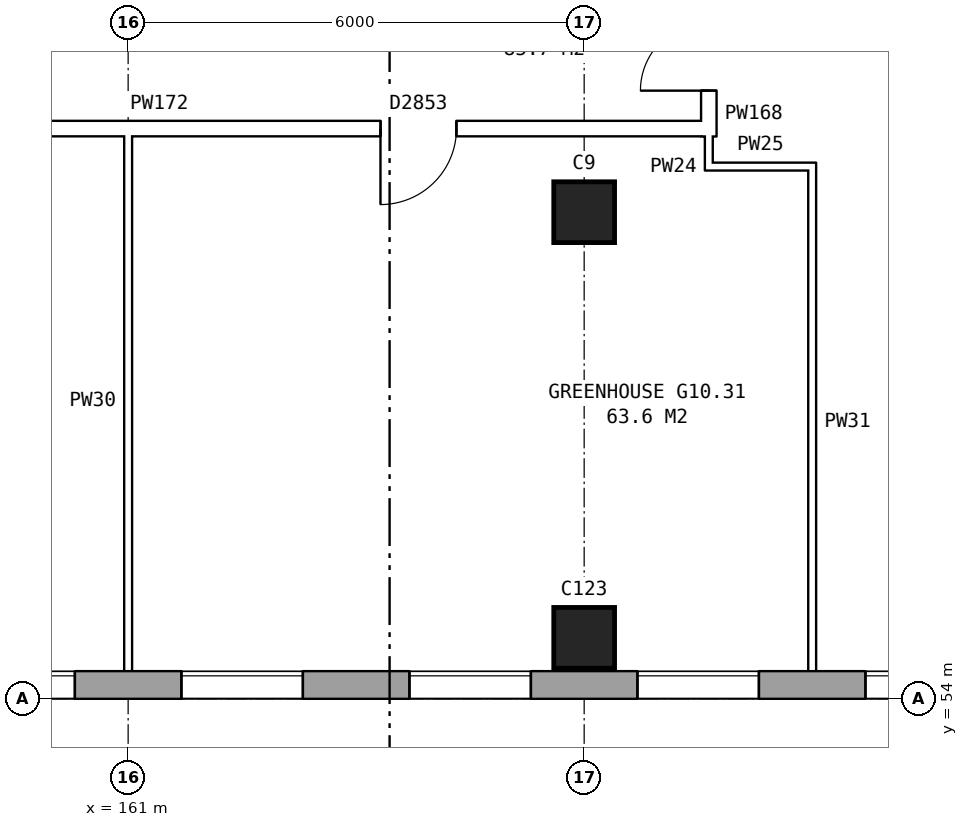
"""IFC4 building model, lengths in metres.
Left out: names, types, materials, properties, quantities, classifications, styles, units other than length and angle.
Written with IfcOpenShell. Run it as: python <this file> out.ifc"""

import sys

from ifc_helpers import new_model, si_unit, direction, frame, frame_2d, origin, origin_2d, place, context, subcontext, project, spatial, rectangle, extrude, element, fill, save


model = new_model("IFC4")
c1 = context("Model", 3, precision=1e-05, world=origin(), true_north=direction((0.0, 1.0)))
c2 = subcontext(c1, "Body", "Model", "MODEL_VIEW")
j1 = project(units=[si_unit("LENGTHUNIT", "METRE"), si_unit("PLANEANGLEUNIT", "RADIAN")], contexts=[c1])
p1 = place(None, origin())
s1 = spatial("IfcSite", under=j1, at=p1, CompositionType="ELEMENT")
p2 = place(p1, origin())
s2 = spatial("IfcBuilding", under=s1, at=p2, CompositionType="ELEMENT")
p3 = place(p2, frame((0.0, 0.0, 38.1)))
s3 = spatial("IfcBuildingStorey", under=s2, at=p3, CompositionType="ELEMENT", Elevation=38.1)
for number, where, z_axis, x_axis in (
    (1, (167.0, 54.8, 0.0), (0.0, 0.0, 1.0), (1.0, 0.0, 0.0)),
    (2, (167.0, 60.4, 0.0), (0.0, 0.0, 1.0), (1.0, 0.0, 0.0)),
):
    element("IfcColumn", number, at=place(p3, frame(where, z_axis=z_axis, x_axis=x_axis)), inside=s3, PredefinedType="COLUMN", context=c2, shape_type="SweptSolid", body=[
        extrude(rectangle(XDim=0.8, YDim=0.8, at=origin_2d()), origin(), (0.0, 0.0, 1.0), 5.6),
    ])
p4 = place(p3, frame((134.075, 54.18, 0.0), z_axis=(0.0, 0.0, 1.0), x_axis=(1.0, 0.0, 0.0)))
e3 = element("IfcWall", 3, at=p4, inside=s3, PredefinedType="STANDARD", context=c2, shape_type="SweptSolid", body=[
    extrude(rectangle(XDim=39.351, YDim=0.36, at=frame_2d((19.675, 0.0))), origin(), (0.0, 0.0, 1.0), 5.6),
])
p5 = place(p4, frame((0.625, 0.0, 0.15)))
e4 = element("IfcOpeningElement", 4, at=p5, cuts=e3, PredefinedType="OPENING", context=c2, shape_type="SweptSolid", body=[
    extrude(rectangle(XDim=1.6, YDim=2.4, at=frame_2d((0.8, 1.2))), frame((0.0, 0.19, 0.0), z_axis=(0.0, -1.0, 0.0), x_axis=(1.0, 0.0, 0.0)), (0.0, 0.0, 1.0), 0.38),
])
p6 = place(p4, frame((3.625, 0.0, 0.15)))
e5 = element("IfcOpeningElement", 5, at=p6, cuts=e3, PredefinedType="OPENING", context=c2, shape_type="SweptSolid", body=[
    extrude(rectangle(XDim=1.6, YDim=2.4, at=frame_2d((0.8, 1.2))), frame((0.0, 0.19, 0.0), z_axis=(0.0, -1.0, 0.0), x_axis=(1.0, 0.0, 0.0)), (0.0, 0.0, 1.0), 0.38),
])
p7 = place(p4, frame((6.625, 0.0, 0.15)))
e6 = element("IfcOpeningElement", 6, at=p7, cuts=e3, PredefinedType="OPENING", context=c2, shape_type="SweptSolid", body=[
    extrude(rectangle(XDim=1.6, YDim=2.4, at=frame_2d((0.8, 1.2))), frame((0.0, 0.19, 0.0), z_axis=(0.0, -1.0, 0.0), x_axis=(1.0, 0.0, 0.0)), (0.0, 0.0, 1.0), 0.38),
])
p8 = place(p4, frame((9.625, 0.0, 0.15)))
e7 = element("IfcOpeningElement", 7, at=p8, cuts=e3, PredefinedType="OPENING", context=c2, shape_type="SweptSolid", body=[
    extrude(rectangle(XDim=1.6, YDim=2.4, at=frame_2d((0.8, 1.2))), frame((0.0, 0.19, 0.0), z_axis=(0.0, -1.0, 0.0), x_axis=(1.0, 0.0, 0.0)), (0.0, 0.0, 1.0), 0.38),
])
p9 = place(p4, frame((12.625, 0.0, 0.15)))
e8 = element("IfcOpeningElement", 8, at=p9, cuts=e3, PredefinedType="OPENING", context=c2, shape_type="SweptSolid", body=[
    extrude(rectangle(XDim=1.6, YDim=2.4, at=frame_2d((0.8, 1.2))), frame((0.0, 0.19, 0.0), z_axis=(0.0, -1.0, 0.0), x_axis=(1.0, 0.0, 0.0)), (0.0, 0.0, 1.0), 0.38),
])
p10 = place(p4, frame((15.625, 0.0, 0.15)))
e9 = element("IfcOpeningElement", 9, at=p10, cuts=e3, PredefinedType="OPENING", context=c2, shape_type="SweptSolid", body=[
    extrude(rectangle(XDim=1.6, YDim=2.4, at=frame_2d((0.8, 1.2))), frame((0.0, 0.19, 0.0), z_axis=(0.0, -1.0, 0.0), x_axis=(1.0, 0.0, 0.0)), (0.0, 0.0, 1.0), 0.38),
])
p11 = place(p4, frame((18.625, 0.0, 0.15)))
e10 = element("IfcOpeningElement", 10, at=p11, cuts=e3, PredefinedType="OPENING", context=c2, shape_type="SweptSolid", body=[
    extrude(rectangle(XDim=1.6, YDim=2.4, at=frame_2d((0.8, 1.2))), frame((0.0, 0.19, 0.0), z_axis=(0.0, -1.0, 0.0), x_axis=(1.0, 0.0, 0.0)), (0.0, 0.0, 1.0), 0.38),
])
p12 = place(p4, frame((21.625, 0.0, 0.15)))
e11 = element("IfcOpeningElement", 11, at=p12, cuts=e3, PredefinedType="OPENING", context=c2, shape_type="SweptSolid", body=[
    extrude(rectangle(XDim=1.6, YDim=2.4, at=frame_2d((0.8, 1.2))), frame((0.0, 0.19, 0.0), z_axis=(0.0, -1.0, 0.0), x_axis=(1.0, 0.0, 0.0)), (0.0, 0.0, 1.0), 0.38),
])
p13 = place(p4, frame((24.625, 0.0, 0.15)))
e12 = element("IfcOpeningElement", 12, at=p13, cuts=e3, PredefinedType="OPENING", context=c2, shape_type="SweptSolid", body=[
    extrude(rectangle(XDim=1.6, YDim=2.4, at=frame_2d((0.8, 1.2))), frame((0.0, 0.19, 0.0), z_axis=(0.0, -1.0, 0.0), x_axis=(1.0, 0.0, 0.0)), (0.0, 0.0, 1.0), 0.38),
])
p14 = place(p4, frame((27.625, 0.0, 0.15)))
e13 = element("IfcOpeningElement", 13, at=p14, cuts=e3, PredefinedType="OPENING", context=c2, shape_type="SweptSolid", body=[
    extrude(rectangle(XDim=1.6, YDim=2.4, at=frame_2d((0.8, 1.2))), frame((0.0, 0.19, 0.0), z_axis=(0.0, -1.0, 0.0), x_axis=(1.0, 0.0, 0.0)), (0.0, 0.0, 1.0), 0.38),
])
p15 = place(p4, frame((30.625, 0.0, 0.15)))
e14 = element("IfcOpeningElement", 14, at=p15, cuts=e3, PredefinedType="OPENING", context=c2, shape_type="SweptSolid", body=[
    extrude(rectangle(XDim=1.6, YDim=2.4, at=frame_2d((0.8, 1.2))), frame((0.0, 0.19, 0.0), z_axis=(0.0, -1.0, 0.0), x_axis=(1.0, 0.0, 0.0)), (0.0, 0.0, 1.0), 0.38),
])
p16 = place(p4, frame((33.625, 0.0, 0.15)))
e15 = element("IfcOpeningElement", 15, at=p16, cuts=e3, PredefinedType="OPENING", context=c2, shape_type="SweptSolid", body=[
    extrude(rectangle(XDim=1.6, YDim=2.4, at=frame_2d((0.8, 1.2))), frame((0.0, 0.19, 0.0), z_axis=(0.0, -1.0, 0.0), x_axis=(1.0, 0.0, 0.0)), (0.0, 0.0, 1.0), 0.38),
])
p17 = place(p4, frame((36.625, 0.0, 0.15)))
e16 = element("IfcOpeningElement", 16, at=p17, cuts=e3, PredefinedType="OPENING", context=c2, shape_type="SweptSolid", body=[
    extrude(rectangle(XDim=1.6, YDim=2.4, at=frame_2d((0.8, 1.2))), frame((0.0, 0.19, 0.0), z_axis=(0.0, -1.0, 0.0), x_axis=(1.0, 0.0, 0.0)), (0.0, 0.0, 1.0), 0.38),
])
p18 = place(p3, frame((168.59, 61.0, 0.0), z_axis=(0.0, 0.0, 1.0), x_axis=(1.0, 0.0, 0.0)))
e17 = element("IfcWall", 17, at=p18, inside=s3, PredefinedType="PARTITIONING", context=c2, shape_type="SweptSolid", body=[
    extrude(rectangle(XDim=1.46, YDim=0.1, at=frame_2d((0.73, 0.0))), origin(), (0.0, 0.0, 1.0), 5.6),
])
p19 = place(p3, frame((131.24, 61.5, 0.0), z_axis=(0.0, 0.0, 1.0), x_axis=(1.0, 0.0, 0.0)))
e18 = element("IfcWall", 18, at=p19, inside=s3, PredefinedType="PARTITIONING", context=c2, shape_type="SweptSolid", body=[
    extrude(rectangle(XDim=37.5, YDim=0.2, at=frame_2d((18.75, 0.0))), origin(), (0.0, 0.0, 1.0), 5.6),
])
p20 = place(p19, frame((2.44, 0.0, 0.0)))
e19 = element("IfcOpeningElement", 19, at=p20, cuts=e18, PredefinedType="OPENING", context=c2, shape_type="SweptSolid", body=[
    extrude(rectangle(XDim=1.0, YDim=2.1, at=frame_2d((0.5, 1.05))), frame((0.0, 0.11, 0.0), z_axis=(0.0, -1.0, 0.0), x_axis=(1.0, 0.0, 0.0)), (0.0, 0.0, 1.0), 0.22),
])
p21 = place(p19, frame((8.26, 0.0, 0.0)))
e20 = element("IfcOpeningElement", 20, at=p21, cuts=e18, PredefinedType="OPENING", context=c2, shape_type="SweptSolid", body=[
    extrude(rectangle(XDim=1.0, YDim=2.1, at=frame_2d((0.5, 1.05))), frame((0.0, 0.11, 0.0), z_axis=(0.0, -1.0, 0.0), x_axis=(1.0, 0.0, 0.0)), (0.0, 0.0, 1.0), 0.22),
])
p22 = place(p19, frame((14.26, 0.0, 0.0)))
e21 = element("IfcOpeningElement", 21, at=p22, cuts=e18, PredefinedType="OPENING", context=c2, shape_type="SweptSolid", body=[
    extrude(rectangle(XDim=1.0, YDim=2.1, at=frame_2d((0.5, 1.05))), frame((0.0, 0.11, 0.0), z_axis=(0.0, -1.0, 0.0), x_axis=(1.0, 0.0, 0.0)), (0.0, 0.0, 1.0), 0.22),
])
p23 = place(p19, frame((20.26, 0.0, 0.0)))
e22 = element("IfcOpeningElement", 22, at=p23, cuts=e18, PredefinedType="OPENING", context=c2, shape_type="SweptSolid", body=[
    extrude(rectangle(XDim=1.0, YDim=2.1, at=frame_2d((0.5, 1.05))), frame((0.0, 0.11, 0.0), z_axis=(0.0, -1.0, 0.0), x_axis=(1.0, 0.0, 0.0)), (0.0, 0.0, 1.0), 0.22),
])
p24 = place(p19, frame((26.26, 0.0, 0.0)))
e23 = element("IfcOpeningElement", 23, at=p24, cuts=e18, PredefinedType="OPENING", context=c2, shape_type="SweptSolid", body=[
    extrude(rectangle(XDim=1.0, YDim=2.1, at=frame_2d((0.5, 1.05))), frame((0.0, 0.11, 0.0), z_axis=(0.0, -1.0, 0.0), x_axis=(1.0, 0.0, 0.0)), (0.0, 0.0, 1.0), 0.22),
])
p25 = place(p19, frame((33.08, 0.0, 0.0)))
e24 = element("IfcOpeningElement", 24, at=p25, cuts=e18, PredefinedType="OPENING", context=c2, shape_type="SweptSolid", body=[
    extrude(rectangle(XDim=1.0, YDim=2.1, at=frame_2d((0.5, 1.05))), frame((0.0, 0.11, 0.0), z_axis=(0.0, -1.0, 0.0), x_axis=(1.0, 0.0, 0.0)), (0.0, 0.0, 1.0), 0.22),
])
p26 = place(p3, frame((161.0, 54.24, 0.0), z_axis=(0.0, 0.0, 1.0), x_axis=(0.0, 1.0, 0.0)))
e25 = element("IfcWall", 25, at=p26, inside=s3, PredefinedType="PARTITIONING", context=c2, shape_type="SweptSolid", body=[
    extrude(rectangle(XDim=7.36, YDim=0.1, at=frame_2d((3.68, 0.0))), origin(), (0.0, 0.0, 1.0), 5.6),
])
p27 = place(p3, frame((168.64, 61.398, 0.0), z_axis=(0.0, 0.0, 1.0), x_axis=(0.0, 1.0, 0.0)))
e26 = element("IfcWall", 26, at=p27, inside=s3, PredefinedType="PARTITIONING", context=c2, shape_type="SweptSolid", body=[
    extrude(rectangle(XDim=2.402, YDim=0.2, at=frame_2d((1.201, 0.0))), origin(), (0.0, 0.0, 1.0), 5.6),
])
p28 = place(p27, frame((0.601, 0.0, 0.0)))
e27 = element("IfcOpeningElement", 27, at=p28, cuts=e26, PredefinedType="OPENING", context=c2, shape_type="SweptSolid", body=[
    extrude(rectangle(XDim=1.8, YDim=2.1, at=frame_2d((0.9, 1.05))), frame((0.0, 0.11, 0.0), z_axis=(0.0, -1.0, 0.0), x_axis=(1.0, 0.0, 0.0)), (0.0, 0.0, 1.0), 0.22),
])
p29 = place(p3, frame((168.64, 60.95, 0.0), z_axis=(0.0, 0.0, 1.0), x_axis=(0.0, 1.0, 0.0)))
e28 = element("IfcWall", 28, at=p29, inside=s3, PredefinedType="PARTITIONING", context=c2, shape_type="SweptSolid", body=[
    extrude(rectangle(XDim=0.65, YDim=0.1, at=frame_2d((0.325, 0.0))), origin(), (0.0, 0.0, 1.0), 5.6),
])
p30 = place(p3, frame((170.0, 54.24, 0.0), z_axis=(0.0, 0.0, 1.0), x_axis=(0.0, 1.0, 0.0)))
e29 = element("IfcWall", 29, at=p30, inside=s3, PredefinedType="PARTITIONING", context=c2, shape_type="SweptSolid", body=[
    extrude(rectangle(XDim=6.81, YDim=0.1, at=frame_2d((3.405, 0.0))), origin(), (0.0, 0.0, 1.0), 5.6),
])
p31 = place(p13, origin())
e30 = element("IfcWindow", 30, at=p31, inside=s3, PartitioningType="SINGLE_PANEL", PredefinedType="WINDOW", context=c2, shape_type="SweptSolid", body=[
    extrude(rectangle(XDim=1.6, YDim=2.4, at=frame_2d((0.8, 1.2))), frame((0.0, 0.15, 0.0), z_axis=(0.0, -1.0, 0.0), x_axis=(1.0, 0.0, 0.0)), (0.0, 0.0, 1.0), 0.06),
])
fill(e12, e30)
p32 = place(p14, origin())
e31 = element("IfcWindow", 31, at=p32, inside=s3, PartitioningType="SINGLE_PANEL", PredefinedType="WINDOW", context=c2, shape_type="SweptSolid", body=[
    extrude(rectangle(XDim=1.6, YDim=2.4, at=frame_2d((0.8, 1.2))), frame((0.0, 0.15, 0.0), z_axis=(0.0, -1.0, 0.0), x_axis=(1.0, 0.0, 0.0)), (0.0, 0.0, 1.0), 0.06),
])
fill(e13, e31)
p33 = place(p15, origin())
e32 = element("IfcWindow", 32, at=p33, inside=s3, PartitioningType="SINGLE_PANEL", PredefinedType="WINDOW", context=c2, shape_type="SweptSolid", body=[
    extrude(rectangle(XDim=1.6, YDim=2.4, at=frame_2d((0.8, 1.2))), frame((0.0, 0.15, 0.0), z_axis=(0.0, -1.0, 0.0), x_axis=(1.0, 0.0, 0.0)), (0.0, 0.0, 1.0), 0.06),
])
fill(e14, e32)
p34 = place(p16, origin())
e33 = element("IfcWindow", 33, at=p34, inside=s3, PartitioningType="SINGLE_PANEL", PredefinedType="WINDOW", context=c2, shape_type="SweptSolid", body=[
    extrude(rectangle(XDim=1.6, YDim=2.4, at=frame_2d((0.8, 1.2))), frame((0.0, 0.15, 0.0), z_axis=(0.0, -1.0, 0.0), x_axis=(1.0, 0.0, 0.0)), (0.0, 0.0, 1.0), 0.06),
])
fill(e15, e33)
p35 = place(p17, origin())
e34 = element("IfcWindow", 34, at=p35, inside=s3, PartitioningType="SINGLE_PANEL", PredefinedType="WINDOW", context=c2, shape_type="SweptSolid", body=[
    extrude(rectangle(XDim=1.6, YDim=2.4, at=frame_2d((0.8, 1.2))), frame((0.0, 0.15, 0.0), z_axis=(0.0, -1.0, 0.0), x_axis=(1.0, 0.0, 0.0)), (0.0, 0.0, 1.0), 0.06),
])
fill(e16, e34)
p36 = place(p25, frame((1.0, 0.0, 0.0), z_axis=(0.0, 0.0, 1.0), x_axis=(-1.0, 0.0, 0.0)))
e35 = element("IfcDoor", 35, at=p36, inside=s3, OperationType="SINGLE_SWING_RIGHT", PredefinedType="DOOR", context=c2, shape_type="SweptSolid", body=[
    extrude(rectangle(XDim=1.0, YDim=2.1, at=frame_2d((0.5, 1.05))), frame((0.0, 0.025, 0.0), z_axis=(0.0, -1.0, 0.0), x_axis=(1.0, 0.0, 0.0)), (0.0, 0.0, 1.0), 0.05),
])
fill(e24, e35)
p37 = place(p28, origin())
e36 = element("IfcDoor", 36, at=p37, inside=s3, OperationType="DOUBLE_DOOR_SINGLE_SWING", PredefinedType="DOOR", context=c2, shape_type="SweptSolid", body=[
    extrude(rectangle(XDim=1.8, YDim=2.1, at=frame_2d((0.9, 1.05))), frame((0.0, 0.025, 0.0), z_axis=(0.0, -1.0, 0.0), x_axis=(1.0, 0.0, 0.0)), (0.0, 0.0, 1.0), 0.05),
])
fill(e27, e36)
save(model, sys.argv[1])
